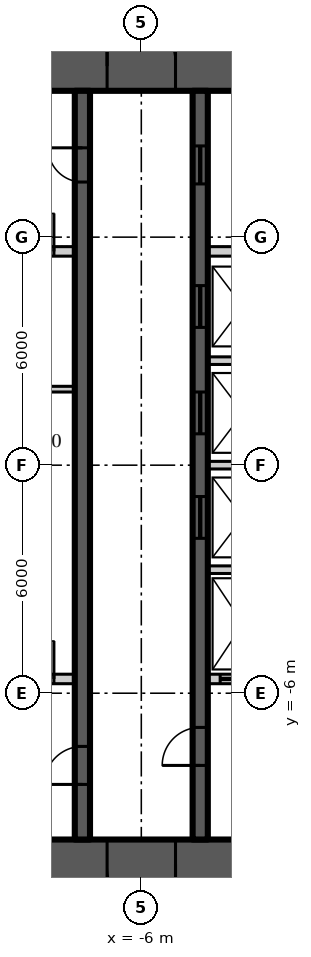
"""IFC4 building model, lengths in metres.
Left out: names, types, materials, properties, quantities, classifications, styles, units other than length and angle.
Written with IfcOpenShell. Run it as: python <this file> out.ifc"""

import sys

from ifc_helpers import new_model, si_unit, direction, frame, frame_2d, origin, place, context, subcontext, project, spatial, rectangle, extrude, element, fill, save


model = new_model("IFC4")
c1 = context("Model", 3, precision=1e-05, world=origin(), true_north=direction((0.0, 1.0)))
c2 = subcontext(c1, "Body", "Model", "MODEL_VIEW")
j1 = project(units=[si_unit("LENGTHUNIT", "METRE"), si_unit("PLANEANGLEUNIT", "RADIAN")], contexts=[c1])
p1 = place(None, origin())
s1 = spatial("IfcSite", under=j1, at=p1, CompositionType="ELEMENT")
p2 = place(p1, origin())
s2 = spatial("IfcBuilding", under=s1, at=p2, CompositionType="ELEMENT")
p3 = place(p2, frame((0.0, 0.0, 159.3)))
s3 = spatial("IfcBuildingStorey", under=s2, at=p3, CompositionType="ELEMENT", Elevation=159.3)
p4 = place(p3, frame((-11.15, 10.5, 0.0), z_axis=(0.0, 0.0, 1.0), x_axis=(1.0, 0.0, 0.0)))
e1 = element("IfcWall", 1, at=p4, inside=s3, PredefinedType="SHEAR", context=c2, shape_type="SweptSolid", body=[
    extrude(rectangle(XDim=22.3, YDim=1.3, at=frame_2d((11.15, 0.0))), origin(), (0.0, 0.0, 1.0), 3.9),
])
p5 = place(p4, frame((4.25, 0.0, 0.0)))
e2 = element("IfcOpeningElement", 2, at=p5, cuts=e1, PredefinedType="OPENING", context=c2, shape_type="SweptSolid", body=[
    extrude(rectangle(XDim=1.8, YDim=2.2, at=frame_2d((0.9, 1.1))), frame((0.0, 0.66, 0.0), z_axis=(0.0, -1.0, 0.0), x_axis=(1.0, 0.0, 0.0)), (0.0, 0.0, 1.0), 1.32),
])
p6 = place(p4, frame((16.25, 0.0, 0.0)))
e3 = element("IfcOpeningElement", 3, at=p6, cuts=e1, PredefinedType="OPENING", context=c2, shape_type="SweptSolid", body=[
    extrude(rectangle(XDim=1.8, YDim=2.2, at=frame_2d((0.9, 1.1))), frame((0.0, 0.66, 0.0), z_axis=(0.0, -1.0, 0.0), x_axis=(1.0, 0.0, 0.0)), (0.0, 0.0, 1.0), 1.32),
])
p7 = place(p3, frame((11.15, -10.5, 0.0), z_axis=(0.0, 0.0, 1.0), x_axis=(-1.0, 0.0, 0.0)))
e4 = element("IfcWall", 4, at=p7, inside=s3, PredefinedType="SHEAR", context=c2, shape_type="SweptSolid", body=[
    extrude(rectangle(XDim=22.3, YDim=1.3, at=frame_2d((11.15, 0.0))), origin(), (0.0, 0.0, 1.0), 3.9),
])
p8 = place(p7, frame((16.25, 0.0, 0.0)))
e5 = element("IfcOpeningElement", 5, at=p8, cuts=e4, PredefinedType="OPENING", context=c2, shape_type="SweptSolid", body=[
    extrude(rectangle(XDim=1.8, YDim=2.2, at=frame_2d((0.9, 1.1))), frame((0.0, 0.66, 0.0), z_axis=(0.0, -1.0, 0.0), x_axis=(1.0, 0.0, 0.0)), (0.0, 0.0, 1.0), 1.32),
])
p9 = place(p7, frame((4.25, 0.0, 0.0)))
e6 = element("IfcOpeningElement", 6, at=p9, cuts=e4, PredefinedType="OPENING", context=c2, shape_type="SweptSolid", body=[
    extrude(rectangle(XDim=1.8, YDim=2.2, at=frame_2d((0.9, 1.1))), frame((0.0, 0.66, 0.0), z_axis=(0.0, -1.0, 0.0), x_axis=(1.0, 0.0, 0.0)), (0.0, 0.0, 1.0), 1.32),
])
p10 = place(p3, frame((-7.55, -9.85, 0.0), z_axis=(0.0, 0.0, 1.0), x_axis=(0.0, 1.0, 0.0)))
e7 = element("IfcWall", 7, at=p10, inside=s3, PredefinedType="SHEAR", context=c2, shape_type="SweptSolid", body=[
    extrude(rectangle(XDim=19.7, YDim=0.4, at=frame_2d((9.85, 0.0))), origin(), (0.0, 0.0, 1.0), 3.9),
])
p11 = place(p10, frame((1.45, 0.0, 0.0)))
e8 = element("IfcOpeningElement", 8, at=p11, cuts=e7, PredefinedType="OPENING", context=c2, shape_type="SweptSolid", body=[
    extrude(rectangle(XDim=1.0, YDim=2.2, at=frame_2d((0.5, 1.1))), frame((0.0, 0.21, 0.0), z_axis=(0.0, -1.0, 0.0), x_axis=(1.0, 0.0, 0.0)), (0.0, 0.0, 1.0), 0.42),
])
p12 = place(p10, frame((17.3, 0.0, 0.0)))
e9 = element("IfcOpeningElement", 9, at=p12, cuts=e7, PredefinedType="OPENING", context=c2, shape_type="SweptSolid", body=[
    extrude(rectangle(XDim=0.9, YDim=2.1, at=frame_2d((0.45, 1.05))), frame((0.0, 0.21, 0.0), z_axis=(0.0, -1.0, 0.0), x_axis=(1.0, 0.0, 0.0)), (0.0, 0.0, 1.0), 0.42),
])
p13 = place(p3, frame((-4.45, -9.85, 0.0), z_axis=(0.0, 0.0, 1.0), x_axis=(0.0, 1.0, 0.0)))
e10 = element("IfcWall", 10, at=p13, inside=s3, PredefinedType="SHEAR", context=c2, shape_type="SweptSolid", body=[
    extrude(rectangle(XDim=19.7, YDim=0.4, at=frame_2d((9.85, 0.0))), origin(), (0.0, 0.0, 1.0), 3.9),
])
p14 = place(p13, frame((1.95, 0.0, 0.0)))
e11 = element("IfcOpeningElement", 11, at=p14, cuts=e10, PredefinedType="OPENING", context=c2, shape_type="SweptSolid", body=[
    extrude(rectangle(XDim=1.0, YDim=2.2, at=frame_2d((0.5, 1.1))), frame((0.0, 0.21, 0.0), z_axis=(0.0, -1.0, 0.0), x_axis=(1.0, 0.0, 0.0)), (0.0, 0.0, 1.0), 0.42),
])
p15 = place(p13, frame((17.25, 0.0, 0.0)))
e12 = element("IfcOpeningElement", 12, at=p15, cuts=e10, PredefinedType="OPENING", context=c2, shape_type="SweptSolid", body=[
    extrude(rectangle(XDim=1.0, YDim=2.1, at=frame_2d((0.5, 1.05))), frame((0.0, 0.21, 0.0), z_axis=(0.0, -1.0, 0.0), x_axis=(1.0, 0.0, 0.0)), (0.0, 0.0, 1.0), 0.42),
])
p16 = place(p13, frame((7.925, 0.0, 0.0)))
e13 = element("IfcOpeningElement", 13, at=p16, cuts=e10, PredefinedType="OPENING", context=c2, shape_type="SweptSolid", body=[
    extrude(rectangle(XDim=1.1, YDim=2.2, at=frame_2d((0.55, 1.1))), frame((0.0, 0.21, 0.0), z_axis=(0.0, -1.0, 0.0), x_axis=(1.0, 0.0, 0.0)), (0.0, 0.0, 1.0), 0.42),
])
p17 = place(p13, frame((10.675, 0.0, 0.0)))
e14 = element("IfcOpeningElement", 14, at=p17, cuts=e10, PredefinedType="OPENING", context=c2, shape_type="SweptSolid", body=[
    extrude(rectangle(XDim=1.1, YDim=2.2, at=frame_2d((0.55, 1.1))), frame((0.0, 0.21, 0.0), z_axis=(0.0, -1.0, 0.0), x_axis=(1.0, 0.0, 0.0)), (0.0, 0.0, 1.0), 0.42),
])
p18 = place(p13, frame((13.475, 0.0, 0.0)))
e15 = element("IfcOpeningElement", 15, at=p18, cuts=e10, PredefinedType="OPENING", context=c2, shape_type="SweptSolid", body=[
    extrude(rectangle(XDim=1.1, YDim=2.2, at=frame_2d((0.55, 1.1))), frame((0.0, 0.21, 0.0), z_axis=(0.0, -1.0, 0.0), x_axis=(1.0, 0.0, 0.0)), (0.0, 0.0, 1.0), 0.42),
])
p19 = place(p3, frame((-9.85, 5.625, 0.0), z_axis=(0.0, 0.0, 1.0), x_axis=(1.0, 0.0, 0.0)))
e16 = element("IfcWall", 16, at=p19, inside=s3, PredefinedType="SOLIDWALL", context=c2, shape_type="SweptSolid", body=[
    extrude(rectangle(XDim=2.1, YDim=0.25, at=frame_2d((1.05, 0.0))), origin(), (0.0, 0.0, 1.0), 3.7),
])
p20 = place(p19, frame((0.55, 0.0, 0.0)))
e17 = element("IfcOpeningElement", 17, at=p20, cuts=e16, PredefinedType="OPENING", context=c2, shape_type="SweptSolid", body=[
    extrude(rectangle(XDim=1.0, YDim=2.2, at=frame_2d((0.5, 1.1))), frame((0.0, 0.135, 0.0), z_axis=(0.0, -1.0, 0.0), x_axis=(1.0, 0.0, 0.0)), (0.0, 0.0, 1.0), 0.27),
])
p21 = place(p3, frame((-4.25, 5.625, 0.0), z_axis=(0.0, 0.0, 1.0), x_axis=(1.0, 0.0, 0.0)))
e18 = element("IfcWall", 18, at=p21, inside=s3, PredefinedType="SOLIDWALL", context=c2, shape_type="SweptSolid", body=[
    extrude(rectangle(XDim=1.85, YDim=0.25, at=frame_2d((0.925, 0.0))), origin(), (0.0, 0.0, 1.0), 3.7),
])
p22 = place(p3, frame((-9.85, -5.625, 0.0), z_axis=(0.0, 0.0, 1.0), x_axis=(1.0, 0.0, 0.0)))
e19 = element("IfcWall", 19, at=p22, inside=s3, PredefinedType="SOLIDWALL", context=c2, shape_type="SweptSolid", body=[
    extrude(rectangle(XDim=2.1, YDim=0.25, at=frame_2d((1.05, 0.0))), origin(), (0.0, 0.0, 1.0), 3.7),
])
p23 = place(p22, frame((0.55, 0.0, 0.0)))
e20 = element("IfcOpeningElement", 20, at=p23, cuts=e19, PredefinedType="OPENING", context=c2, shape_type="SweptSolid", body=[
    extrude(rectangle(XDim=1.0, YDim=2.2, at=frame_2d((0.5, 1.1))), frame((0.0, 0.135, 0.0), z_axis=(0.0, -1.0, 0.0), x_axis=(1.0, 0.0, 0.0)), (0.0, 0.0, 1.0), 0.27),
])
p24 = place(p3, frame((-4.25, -5.625, 0.0), z_axis=(0.0, 0.0, 1.0), x_axis=(1.0, 0.0, 0.0)))
e21 = element("IfcWall", 21, at=p24, inside=s3, PredefinedType="SOLIDWALL", context=c2, shape_type="SweptSolid", body=[
    extrude(rectangle(XDim=1.85, YDim=0.25, at=frame_2d((0.925, 0.0))), origin(), (0.0, 0.0, 1.0), 3.7),
])
p25 = place(p24, frame((0.325, 0.0, 0.0)))
e22 = element("IfcOpeningElement", 22, at=p25, cuts=e21, PredefinedType="OPENING", context=c2, shape_type="SweptSolid", body=[
    extrude(rectangle(XDim=1.2, YDim=2.2, at=frame_2d((0.6, 1.1))), frame((0.0, 0.135, 0.0), z_axis=(0.0, -1.0, 0.0), x_axis=(1.0, 0.0, 0.0)), (0.0, 0.0, 1.0), 0.27),
])
for number, where, z_axis, x_axis in (
    (23, (-4.25, -2.75, 0.0), (0.0, 0.0, 1.0), (1.0, 0.0, 0.0)),
    (24, (-4.25, 0.0, 0.0), (0.0, 0.0, 1.0), (1.0, 0.0, 0.0)),
    (25, (-4.25, 2.75, 0.0), (0.0, 0.0, 1.0), (1.0, 0.0, 0.0)),
):
    element("IfcWall", number, at=place(p3, frame(where, z_axis=z_axis, x_axis=x_axis)), inside=s3, PredefinedType="SOLIDWALL", context=c2, shape_type="SweptSolid", body=[
        extrude(rectangle(XDim=1.85, YDim=0.2, at=frame_2d((0.925, 0.0))), origin(), (0.0, 0.0, 1.0), 3.7),
    ])
p26 = place(p3, frame((-9.85, 2.0, 0.0), z_axis=(0.0, 0.0, 1.0), x_axis=(1.0, 0.0, 0.0)))
e26 = element("IfcWall", 26, at=p26, inside=s3, PredefinedType="SOLIDWALL", context=c2, shape_type="SweptSolid", body=[
    extrude(rectangle(XDim=2.1, YDim=0.15, at=frame_2d((1.05, 0.0))), origin(), (0.0, 0.0, 1.0), 3.77),
])
p27 = place(p5, origin())
e27 = element("IfcDoor", 27, at=p27, inside=s3, OperationType="DOUBLE_DOOR_DOUBLE_SWING", PredefinedType="DOOR", context=c2, shape_type="SweptSolid", body=[
    extrude(rectangle(XDim=1.8, YDim=2.2, at=frame_2d((0.9, 1.1))), frame((0.0, 0.025, 0.0), z_axis=(0.0, -1.0, 0.0), x_axis=(1.0, 0.0, 0.0)), (0.0, 0.0, 1.0), 0.05),
])
fill(e2, e27)
p28 = place(p8, origin())
e28 = element("IfcDoor", 28, at=p28, inside=s3, OperationType="DOUBLE_DOOR_DOUBLE_SWING", PredefinedType="DOOR", context=c2, shape_type="SweptSolid", body=[
    extrude(rectangle(XDim=1.8, YDim=2.2, at=frame_2d((0.9, 1.1))), frame((0.0, 0.025, 0.0), z_axis=(0.0, -1.0, 0.0), x_axis=(1.0, 0.0, 0.0)), (0.0, 0.0, 1.0), 0.05),
])
fill(e5, e28)
p29 = place(p11, origin())
e29 = element("IfcDoor", 29, at=p29, inside=s3, OperationType="SINGLE_SWING_LEFT", PredefinedType="DOOR", context=c2, shape_type="SweptSolid", body=[
    extrude(rectangle(XDim=1.0, YDim=2.2, at=frame_2d((0.5, 1.1))), frame((0.0, 0.025, 0.0), z_axis=(0.0, -1.0, 0.0), x_axis=(1.0, 0.0, 0.0)), (0.0, 0.0, 1.0), 0.05),
])
fill(e8, e29)
p30 = place(p14, origin())
e30 = element("IfcDoor", 30, at=p30, inside=s3, OperationType="SINGLE_SWING_LEFT", PredefinedType="DOOR", context=c2, shape_type="SweptSolid", body=[
    extrude(rectangle(XDim=1.0, YDim=2.2, at=frame_2d((0.5, 1.1))), frame((0.0, 0.025, 0.0), z_axis=(0.0, -1.0, 0.0), x_axis=(1.0, 0.0, 0.0)), (0.0, 0.0, 1.0), 0.05),
])
fill(e11, e30)
p31 = place(p12, origin())
e31 = element("IfcDoor", 31, at=p31, inside=s3, OperationType="SINGLE_SWING_RIGHT", PredefinedType="DOOR", context=c2, shape_type="SweptSolid", body=[
    extrude(rectangle(XDim=0.9, YDim=2.1, at=frame_2d((0.45, 1.05))), frame((0.0, 0.025, 0.0), z_axis=(0.0, -1.0, 0.0), x_axis=(1.0, 0.0, 0.0)), (0.0, 0.0, 1.0), 0.05),
])
fill(e9, e31)
p32 = place(p15, origin())
e32 = element("IfcDoor", 32, at=p32, inside=s3, OperationType="SLIDING_TO_LEFT", PredefinedType="DOOR", context=c2, shape_type="SweptSolid", body=[
    extrude(rectangle(XDim=1.0, YDim=2.1, at=frame_2d((0.5, 1.05))), frame((0.0, 0.025, 0.0), z_axis=(0.0, -1.0, 0.0), x_axis=(1.0, 0.0, 0.0)), (0.0, 0.0, 1.0), 0.05),
])
fill(e12, e32)
p33 = place(p16, origin())
e33 = element("IfcDoor", 33, at=p33, inside=s3, OperationType="SLIDING_TO_LEFT", PredefinedType="DOOR", context=c2, shape_type="SweptSolid", body=[
    extrude(rectangle(XDim=1.1, YDim=2.2, at=frame_2d((0.55, 1.1))), frame((0.0, 0.025, 0.0), z_axis=(0.0, -1.0, 0.0), x_axis=(1.0, 0.0, 0.0)), (0.0, 0.0, 1.0), 0.05),
])
fill(e13, e33)
p34 = place(p17, origin())
e34 = element("IfcDoor", 34, at=p34, inside=s3, OperationType="SLIDING_TO_LEFT", PredefinedType="DOOR", context=c2, shape_type="SweptSolid", body=[
    extrude(rectangle(XDim=1.1, YDim=2.2, at=frame_2d((0.55, 1.1))), frame((0.0, 0.025, 0.0), z_axis=(0.0, -1.0, 0.0), x_axis=(1.0, 0.0, 0.0)), (0.0, 0.0, 1.0), 0.05),
])
fill(e14, e34)
p35 = place(p18, origin())
e35 = element("IfcDoor", 35, at=p35, inside=s3, OperationType="SLIDING_TO_LEFT", PredefinedType="DOOR", context=c2, shape_type="SweptSolid", body=[
    extrude(rectangle(XDim=1.1, YDim=2.2, at=frame_2d((0.55, 1.1))), frame((0.0, 0.025, 0.0), z_axis=(0.0, -1.0, 0.0), x_axis=(1.0, 0.0, 0.0)), (0.0, 0.0, 1.0), 0.05),
])
fill(e15, e35)
p36 = place(p25, origin())
e36 = element("IfcDoor", 36, at=p36, inside=s3, OperationType="SLIDING_TO_LEFT", PredefinedType="DOOR", context=c2, shape_type="SweptSolid", body=[
    extrude(rectangle(XDim=1.2, YDim=2.2, at=frame_2d((0.6, 1.1))), frame((0.0, 0.025, 0.0), z_axis=(0.0, -1.0, 0.0), x_axis=(1.0, 0.0, 0.0)), (0.0, 0.0, 1.0), 0.05),
])
fill(e22, e36)
p37 = place(p20, origin())
e37 = element("IfcDoor", 37, at=p37, inside=s3, OperationType="SINGLE_SWING_RIGHT", PredefinedType="DOOR", context=c2, shape_type="SweptSolid", body=[
    extrude(rectangle(XDim=1.0, YDim=2.2, at=frame_2d((0.5, 1.1))), frame((0.0, 0.025, 0.0), z_axis=(0.0, -1.0, 0.0), x_axis=(1.0, 0.0, 0.0)), (0.0, 0.0, 1.0), 0.05),
])
fill(e17, e37)
p38 = place(p23, origin())
e38 = element("IfcDoor", 38, at=p38, inside=s3, OperationType="SINGLE_SWING_RIGHT", PredefinedType="DOOR", context=c2, shape_type="SweptSolid", body=[
    extrude(rectangle(XDim=1.0, YDim=2.2, at=frame_2d((0.5, 1.1))), frame((0.0, 0.025, 0.0), z_axis=(0.0, -1.0, 0.0), x_axis=(1.0, 0.0, 0.0)), (0.0, 0.0, 1.0), 0.05),
])
fill(e20, e38)
save(model, sys.argv[1])
